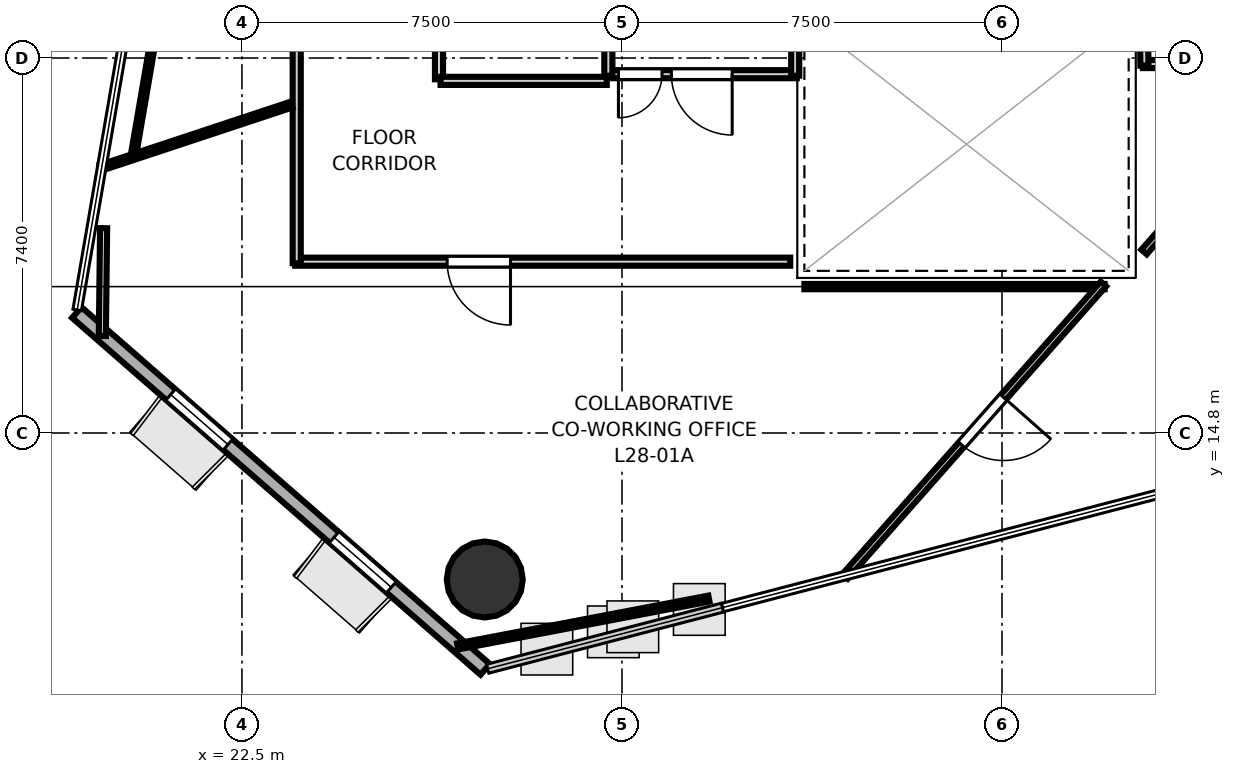
"""IFC4 building model, lengths in metres.
Left out: names, types, materials, properties, quantities, classifications, styles, units other than length and angle.
Written with IfcOpenShell. Run it as: python <this file> out.ifc"""

import sys

from ifc_helpers import new_model, si_unit, direction, frame, frame_2d, origin, origin_2d, place, context, subcontext, project, spatial, rectangle, hollow_circle, extrude, element, fill, save


model = new_model("IFC4")
c1 = context("Model", 3, precision=1e-05, world=origin(), true_north=direction((0.0, 1.0)))
c2 = subcontext(c1, "Body", "Model", "MODEL_VIEW")
j1 = project(units=[si_unit("LENGTHUNIT", "METRE"), si_unit("PLANEANGLEUNIT", "RADIAN")], contexts=[c1])
p1 = place(None, origin())
s1 = spatial("IfcSite", under=j1, at=p1, CompositionType="ELEMENT")
p2 = place(p1, origin())
s2 = spatial("IfcBuilding", under=s1, at=p2, CompositionType="ELEMENT")
p3 = place(p2, frame((0.0, 0.0, 112.6)))
s3 = spatial("IfcBuildingStorey", under=s2, at=p3, CompositionType="ELEMENT", Elevation=112.6)
p4 = place(p3, frame((27.292, 11.909, 0.0), z_axis=(0.0, 0.0, 1.0), x_axis=(1.0, 0.0, 0.0)))
e1 = element("IfcColumn", 1, at=p4, inside=s3, PredefinedType="COLUMN", context=c2, shape_type="SweptSolid", body=[
    extrude(hollow_circle(Radius=0.75, WallThickness=0.036, at=origin_2d()), origin(), (0.0, 0.0, 1.0), 3.7),
])
p5 = place(p3, frame((19.24, 17.179, 0.0), z_axis=(0.0, 0.0, 1.0), x_axis=(0.753037088213, -0.657978072413, 0.0)))
e2 = element("IfcWall", 2, at=p5, inside=s3, PredefinedType="SOLIDWALL", context=c2, shape_type="SweptSolid", body=[
    extrude(rectangle(XDim=10.705, YDim=0.28, at=frame_2d((5.352, 0.0))), origin(), (0.0, 0.0, 1.0), 3.52),
])
p6 = place(p5, frame((2.461, 0.0, 0.85)))
e3 = element("IfcOpeningElement", 3, at=p6, cuts=e2, PredefinedType="OPENING", context=c2, shape_type="SweptSolid", body=[
    extrude(rectangle(XDim=1.5, YDim=2.1, at=frame_2d((0.75, 1.05))), frame((0.0, 0.15, 0.0), z_axis=(0.0, -1.0, 0.0), x_axis=(1.0, 0.0, 0.0)), (0.0, 0.0, 1.0), 0.3),
])
p7 = place(p5, frame((6.743, 0.0, 0.85)))
e4 = element("IfcOpeningElement", 4, at=p7, cuts=e2, PredefinedType="OPENING", context=c2, shape_type="SweptSolid", body=[
    extrude(rectangle(XDim=1.5, YDim=2.1, at=frame_2d((0.75, 1.05))), frame((0.0, 0.15, 0.0), z_axis=(0.0, -1.0, 0.0), x_axis=(1.0, 0.0, 0.0)), (0.0, 0.0, 1.0), 0.3),
])
p8 = place(p3, frame((33.45, 21.881, 0.0), z_axis=(0.0, 0.0, 1.0), x_axis=(-1.0, 0.0, 0.0)))
e5 = element("IfcWall", 5, at=p8, inside=s3, PredefinedType="PARTITIONING", context=c2, shape_type="SweptSolid", body=[
    extrude(rectangle(XDim=3.75, YDim=0.16, at=frame_2d((1.875, 0.0))), origin(), (0.0, 0.0, 1.0), 2.84),
])
p9 = place(p8, frame((1.275, 0.0, 0.0)))
e6 = element("IfcOpeningElement", 6, at=p9, cuts=e5, PredefinedType="OPENING", context=c2, shape_type="SweptSolid", body=[
    extrude(rectangle(XDim=1.2, YDim=2.15, at=frame_2d((0.6, 1.075))), frame((0.0, 0.09, 0.0), z_axis=(0.0, -1.0, 0.0), x_axis=(1.0, 0.0, 0.0)), (0.0, 0.0, 1.0), 0.18),
])
p10 = place(p8, frame((2.66, 0.0, 0.0)))
e7 = element("IfcOpeningElement", 7, at=p10, cuts=e5, PredefinedType="OPENING", context=c2, shape_type="SweptSolid", body=[
    extrude(rectangle(XDim=0.86, YDim=2.05, at=frame_2d((0.43, 1.025))), frame((0.0, 0.09, 0.0), z_axis=(0.0, -1.0, 0.0), x_axis=(1.0, 0.0, 0.0)), (0.0, 0.0, 1.0), 0.18),
])
for number, where, z_axis, x_axis in (
    (8, (29.731, 21.85, 0.0), (0.0, 0.0, 1.0), (0.0, 1.0, 0.0)),
    (9, (33.419, 24.442, 0.0), (0.0, 0.0, 1.0), (0.0, -1.0, 0.0)),
):
    element("IfcWall", number, at=place(p3, frame(where, z_axis=z_axis, x_axis=x_axis)), inside=s3, PredefinedType="PARTITIONING", context=c2, shape_type="SweptSolid", body=[
        extrude(rectangle(XDim=2.592, YDim=0.16, at=frame_2d((1.296, 0.0))), origin(), (0.0, 0.0, 1.0), 2.84),
    ])
p11 = place(p3, frame((41.36, 22.081, 0.0), z_axis=(0.0, 0.0, 1.0), x_axis=(-1.0, 0.0, 0.0)))
e10 = element("IfcWall", 10, at=p11, inside=s3, PredefinedType="PARTITIONING", context=c2, shape_type="SweptSolid", body=[
    extrude(rectangle(XDim=1.08, YDim=0.16, at=frame_2d((0.54, 0.0))), origin(), (0.0, 0.0, 1.0), 2.84),
])
p12 = place(p3, frame((40.311, 22.05, 0.0), z_axis=(0.0, 0.0, 1.0), x_axis=(-0.011836292006, 0.999929948642, 0.0)))
e11 = element("IfcWall", 11, at=p12, inside=s3, PredefinedType="PARTITIONING", context=c2, shape_type="SweptSolid", body=[
    extrude(rectangle(XDim=1.031, YDim=0.16, at=frame_2d((0.516, 0.0))), origin(), (0.0, 0.0, 1.0), 2.84),
])
p13 = place(p3, frame((26.389, 24.531, 0.0), z_axis=(0.0, 0.0, 1.0), x_axis=(0.0, -1.0, 0.0)))
e12 = element("IfcWall", 12, at=p13, inside=s3, PredefinedType="PARTITIONING", context=c2, shape_type="SweptSolid", body=[
    extrude(rectangle(XDim=2.75, YDim=0.16, at=frame_2d((1.375, 0.0))), origin(), (0.0, 0.0, 1.0), 2.84),
])
p14 = place(p3, frame((26.42, 21.749, 0.0), z_axis=(0.0, 0.0, 1.0), x_axis=(1.0, 0.0, 0.0)))
e13 = element("IfcWall", 13, at=p14, inside=s3, PredefinedType="PARTITIONING", context=c2, shape_type="SweptSolid", body=[
    extrude(rectangle(XDim=3.28, YDim=0.16, at=frame_2d((1.64, 0.0))), origin(), (0.0, 0.0, 1.0), 2.84),
])
p15 = place(p3, frame((33.32, 18.181, 0.0), z_axis=(0.0, 0.0, 1.0), x_axis=(-1.0, 0.0, 0.0)))
e14 = element("IfcWall", 14, at=p15, inside=s3, PredefinedType="PARTITIONING", context=c2, shape_type="SweptSolid", body=[
    extrude(rectangle(XDim=9.77, YDim=0.16, at=frame_2d((4.885, 0.0))), origin(), (0.0, 0.0, 1.0), 2.84),
])
p16 = place(p15, frame((5.52, 0.0, 0.0)))
e15 = element("IfcOpeningElement", 15, at=p16, cuts=e14, PredefinedType="OPENING", context=c2, shape_type="SweptSolid", body=[
    extrude(rectangle(XDim=1.25, YDim=2.2, at=frame_2d((0.625, 1.1))), frame((0.0, 0.09, 0.0), z_axis=(0.0, -1.0, 0.0), x_axis=(1.0, 0.0, 0.0)), (0.0, 0.0, 1.0), 0.18),
])
p17 = place(p3, frame((23.581, 18.15, 0.0), z_axis=(0.0, 0.0, 1.0), x_axis=(0.0, 1.0, 0.0)))
e16 = element("IfcWall", 16, at=p17, inside=s3, PredefinedType="PARTITIONING", context=c2, shape_type="SweptSolid", body=[
    extrude(rectangle(XDim=8.575, YDim=0.16, at=frame_2d((4.288, 0.0))), origin(), (0.0, 0.0, 1.0), 2.84),
])
p18 = place(p3, frame((33.6, 17.689, 0.0), z_axis=(0.0, 0.0, 1.0), x_axis=(1.0, 0.0, 0.0)))
e17 = element("IfcWall", 17, at=p18, inside=s3, PredefinedType="PARTITIONING", context=c2, shape_type="SweptSolid", body=[
    extrude(rectangle(XDim=5.925, YDim=0.105, at=frame_2d((2.962, 0.0))), origin(), (0.0, 0.0, 1.0), 2.84),
])
p19 = place(p3, frame((39.502, 17.74, 0.0), z_axis=(0.0, 0.0, 1.0), x_axis=(-0.662230930848, -0.749299802635, 0.0)))
e18 = element("IfcWall", 18, at=p19, inside=s3, PredefinedType="PARTITIONING", context=c2, shape_type="SweptSolid", body=[
    extrude(rectangle(XDim=7.697, YDim=0.14, at=frame_2d((3.849, 0.0))), origin(), (0.0, 0.0, 1.0), 2.84),
])
p20 = place(p19, frame((2.98, 0.0, 0.0)))
e19 = element("IfcOpeningElement", 19, at=p20, cuts=e18, PredefinedType="OPENING", context=c2, shape_type="SweptSolid", body=[
    extrude(rectangle(XDim=1.25, YDim=2.2, at=frame_2d((0.625, 1.1))), frame((0.0, 0.08, 0.0), z_axis=(0.0, -1.0, 0.0), x_axis=(1.0, 0.0, 0.0)), (0.0, 0.0, 1.0), 0.16),
])
p21 = place(p3, frame((31.716, 11.532, 0.0), z_axis=(0.0, 0.0, 1.0), x_axis=(-0.982373684586, -0.186927643311, 0.0)))
e20 = element("IfcWall", 20, at=p21, inside=s3, PredefinedType="PARTITIONING", context=c2, shape_type="SweptSolid", body=[
    extrude(rectangle(XDim=5.048, YDim=0.12, at=frame_2d((2.524, 0.0))), origin(), (0.0, 0.0, 1.0), 2.84),
])
p22 = place(p3, frame((19.745, 16.715, 0.0), z_axis=(0.0, 0.0, 1.0), x_axis=(0.011705843153, 0.999931484271, 0.0)))
e21 = element("IfcWall", 21, at=p22, inside=s3, PredefinedType="PARTITIONING", context=c2, shape_type="SweptSolid", body=[
    extrude(rectangle(XDim=2.127, YDim=0.14, at=frame_2d((1.064, 0.0))), origin(), (0.0, 0.0, 1.0), 2.84),
])
p23 = place(p3, frame((19.713, 20.034, 0.0), z_axis=(0.0, 0.0, 1.0), x_axis=(0.949321292103, 0.314307308793, 0.0)))
e22 = element("IfcWall", 22, at=p23, inside=s3, PredefinedType="PARTITIONING", context=c2, shape_type="SweptSolid", body=[
    extrude(rectangle(XDim=3.968, YDim=0.12, at=frame_2d((1.984, 0.0))), origin(), (0.0, 0.0, 1.0), 2.84),
])
p24 = place(p3, frame((40.303, 18.372, 0.0), z_axis=(0.0, 0.0, 1.0), x_axis=(0.662221894186, 0.749307789136, 0.0)))
e23 = element("IfcWall", 23, at=p24, inside=s3, PredefinedType="PARTITIONING", context=c2, shape_type="SweptSolid", body=[
    extrude(rectangle(XDim=4.895, YDim=0.14, at=frame_2d((2.447, 0.0))), origin(), (0.0, 0.0, 1.0), 2.84),
])
p25 = place(p3, frame((20.371, 20.358, 0.0), z_axis=(0.0, 0.0, 1.0), x_axis=(0.169525939527, 0.985525725604, 0.0)))
e24 = element("IfcWall", 24, at=p25, inside=s3, PredefinedType="PARTITIONING", context=c2, shape_type="SweptSolid", body=[
    extrude(rectangle(XDim=15.044, YDim=0.105, at=frame_2d((7.522, 0.0))), origin(), (0.0, 0.0, 1.0), 2.095),
])
p26 = place(p9, origin())
e25 = element("IfcDoor", 25, at=p26, inside=s3, OperationType="SINGLE_SWING_LEFT", PredefinedType="DOOR", context=c2, shape_type="SweptSolid", body=[
    extrude(rectangle(XDim=1.2, YDim=2.15, at=frame_2d((0.6, 1.075))), frame((0.0, 0.025, 0.0), z_axis=(0.0, -1.0, 0.0), x_axis=(1.0, 0.0, 0.0)), (0.0, 0.0, 1.0), 0.05),
])
fill(e6, e25)
p27 = place(p10, origin())
e26 = element("IfcDoor", 26, at=p27, inside=s3, OperationType="SINGLE_SWING_RIGHT", PredefinedType="DOOR", context=c2, shape_type="SweptSolid", body=[
    extrude(rectangle(XDim=0.86, YDim=2.05, at=frame_2d((0.43, 1.025))), frame((0.0, 0.025, 0.0), z_axis=(0.0, -1.0, 0.0), x_axis=(1.0, 0.0, 0.0)), (0.0, 0.0, 1.0), 0.05),
])
fill(e7, e26)
p28 = place(p16, origin())
e27 = element("IfcDoor", 27, at=p28, inside=s3, OperationType="SINGLE_SWING_LEFT", PredefinedType="DOOR", context=c2, shape_type="SweptSolid", body=[
    extrude(rectangle(XDim=1.25, YDim=2.2, at=frame_2d((0.625, 1.1))), frame((0.0, 0.025, 0.0), z_axis=(0.0, -1.0, 0.0), x_axis=(1.0, 0.0, 0.0)), (0.0, 0.0, 1.0), 0.05),
])
fill(e15, e27)
p29 = place(p20, origin())
e28 = element("IfcDoor", 28, at=p29, inside=s3, OperationType="SINGLE_SWING_LEFT", PredefinedType="DOOR", context=c2, shape_type="SweptSolid", body=[
    extrude(rectangle(XDim=1.25, YDim=2.2, at=frame_2d((0.625, 1.1))), frame((0.0, 0.025, 0.0), z_axis=(0.0, -1.0, 0.0), x_axis=(1.0, 0.0, 0.0)), (0.0, 0.0, 1.0), 0.05),
])
fill(e19, e28)
p30 = place(p6, origin())
e29 = element("IfcWindow", 29, at=p30, inside=s3, PartitioningType="SINGLE_PANEL", PredefinedType="WINDOW", context=c2, shape_type="SweptSolid", body=[
    extrude(rectangle(XDim=1.5, YDim=2.1, at=frame_2d((0.75, 1.05))), frame((0.0, 0.03, 0.0), z_axis=(0.0, -1.0, 0.0), x_axis=(1.0, 0.0, 0.0)), (0.0, 0.0, 1.0), 0.06),
])
fill(e3, e29)
p31 = place(p7, origin())
e30 = element("IfcWindow", 30, at=p31, inside=s3, PartitioningType="SINGLE_PANEL", PredefinedType="WINDOW", context=c2, shape_type="SweptSolid", body=[
    extrude(rectangle(XDim=1.5, YDim=2.1, at=frame_2d((0.75, 1.05))), frame((0.0, 0.03, 0.0), z_axis=(0.0, -1.0, 0.0), x_axis=(1.0, 0.0, 0.0)), (0.0, 0.0, 1.0), 0.06),
])
fill(e4, e30)
save(model, sys.argv[1])
